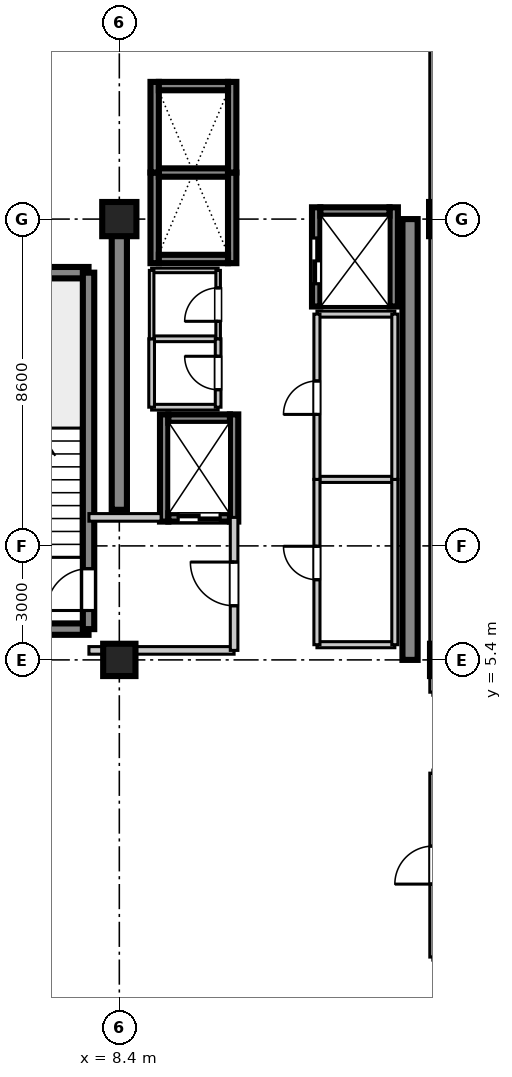
"""IFC4 building model, lengths in metres.
Left out: names, types, materials, properties, quantities, classifications, styles, units other than length and angle.
Written with IfcOpenShell. Run it as: python <this file> out.ifc"""

import sys

from ifc_helpers import new_model, si_unit, direction, frame, frame_2d, origin, origin_2d, place, context, subcontext, project, spatial, rectangle, extrude, source, transform, mapped, element, fill, save


model = new_model("IFC4")
c1 = context("Model", 3, precision=1e-05, world=origin(), true_north=direction((0.0, 1.0)))
c2 = subcontext(c1, "Body", "Model", "MODEL_VIEW")
j1 = project(units=[si_unit("LENGTHUNIT", "METRE"), si_unit("PLANEANGLEUNIT", "RADIAN")], contexts=[c1])
p1 = place(None, origin())
s1 = spatial("IfcSite", under=j1, at=p1, CompositionType="ELEMENT")
p2 = place(p1, origin())
s2 = spatial("IfcBuilding", under=s1, at=p2, CompositionType="ELEMENT")
p3 = place(p2, frame((0.0, 0.0, 266.3)))
s3 = spatial("IfcBuildingStorey", under=s2, at=p3, CompositionType="ELEMENT", Elevation=266.3)
m1 = source(origin(), c2, "Body", "SweptSolid", [
    extrude(rectangle(XDim=0.85, YDim=0.85, at=origin_2d()), origin(), (0.0, 0.0, 1.0), 3.705),
])
p4 = place(p3, frame((8.4, 5.4, 0.0), z_axis=(0.0, 0.0, 1.0), x_axis=(1.0, 0.0, 0.0)))
e1 = element("IfcColumn", 1, at=p4, inside=s3, PredefinedType="PILASTER", context=c2, shape_type="MappedRepresentation", body=[
    mapped(m1, transform((0.0, 0.0, 0.0), scale=1.0)),
])
m2 = source(origin(), c2, "Body", "SweptSolid", [
    extrude(rectangle(XDim=0.9, YDim=0.9, at=origin_2d()), origin(), (0.0, 0.0, 1.0), 3.705),
])
p5 = place(p3, frame((8.4, 17.0, 0.0), z_axis=(0.0, 0.0, 1.0), x_axis=(1.0, 0.0, 0.0)))
e2 = element("IfcColumn", 2, at=p5, inside=s3, PredefinedType="COLUMN", context=c2, shape_type="MappedRepresentation", body=[
    mapped(m2, transform((0.0, 0.0, 0.0), scale=1.0)),
])
p6 = place(p3, frame((17.0, 5.4, 0.0), z_axis=(0.0, 0.0, 1.0), x_axis=(1.0, 0.0, 0.0)))
e3 = element("IfcColumn", 3, at=p6, inside=s3, PredefinedType="PILASTER", context=c2, shape_type="MappedRepresentation", body=[
    mapped(m1, transform((0.0, 0.0, 0.0), scale=1.0)),
])
p7 = place(p3, frame((17.0, 17.0, 0.0), z_axis=(0.0, 0.0, 1.0), x_axis=(1.0, 0.0, 0.0)))
e4 = element("IfcColumn", 4, at=p7, inside=s3, PredefinedType="COLUMN", context=c2, shape_type="MappedRepresentation", body=[
    mapped(m2, transform((0.0, 0.0, 0.0), scale=1.0)),
])
m3 = source(origin(), c2, "Body", "SweptSolid", [
    extrude(rectangle(XDim=7.65, YDim=0.4, at=frame_2d((3.825, 0.0))), origin(), (0.0, 0.0, 1.0), 3.45),
])
p8 = place(p3, frame((8.4, 9.35, 0.0), z_axis=(0.0, 0.0, 1.0), x_axis=(0.0, 1.0, 0.0)))
e5 = element("IfcWall", 5, at=p8, inside=s3, PredefinedType="SHEAR", context=c2, shape_type="MappedRepresentation", body=[
    mapped(m3, transform((0.0, 0.0, 0.0), scale=1.0)),
])
m4 = source(origin(), c2, "Body", "SweptSolid", [
    extrude(rectangle(XDim=11.6, YDim=0.4, at=frame_2d((5.8, 0.0))), origin(), (0.0, 0.0, 1.0), 3.45),
])
p9 = place(p3, frame((16.05, 5.4, 0.0), z_axis=(0.0, 0.0, 1.0), x_axis=(0.0, 1.0, 0.0)))
e6 = element("IfcWall", 6, at=p9, inside=s3, PredefinedType="SHEAR", context=c2, shape_type="MappedRepresentation", body=[
    mapped(m4, transform((0.0, 0.0, 0.0), scale=1.0)),
])
m5 = source(origin(), c2, "Body", "SweptSolid", [
    extrude(rectangle(XDim=3.98, YDim=0.3, at=frame_2d((1.99, 0.0))), origin(), (0.0, 0.0, 1.0), 3.45),
])
for number, where, z_axis, x_axis in (
    (7, (3.61, 6.21, 0.0), (0.0, 0.0, 1.0), (1.0, 0.0, 0.0)),
    (8, (3.61, 15.59, 0.0), (0.0, 0.0, 1.0), (1.0, 0.0, 0.0)),
):
    element("IfcWall", number, at=place(p3, frame(where, z_axis=z_axis, x_axis=x_axis)), inside=s3, PredefinedType="SHEAR", context=c2, shape_type="MappedRepresentation", body=[
        mapped(m5, transform((0.0, 0.0, 0.0), scale=1.0)),
    ])
m6 = source(origin(), c2, "Body", "SweptSolid", [
    extrude(rectangle(XDim=9.38, YDim=0.3, at=frame_2d((4.69, 0.0))), origin(), (0.0, 0.0, 1.0), 3.45),
])
p10 = place(p3, frame((7.59, 6.21, 0.0), z_axis=(0.0, 0.0, 1.0), x_axis=(0.0, 1.0, 0.0)))
e9 = element("IfcWall", 9, at=p10, inside=s3, PredefinedType="SHEAR", context=c2, shape_type="MappedRepresentation", body=[
    mapped(m6, transform((0.0, 0.0, 0.0), scale=1.0)),
])
p11 = place(p10, frame((0.49, 0.0, 0.0)))
e10 = element("IfcOpeningElement", 10, at=p11, cuts=e9, PredefinedType="OPENING", context=c2, shape_type="SweptSolid", body=[
    extrude(rectangle(XDim=1.1, YDim=2.15, at=frame_2d((0.55, 1.075))), frame((0.0, 0.16, 0.0), z_axis=(0.0, -1.0, 0.0), x_axis=(1.0, 0.0, 0.0)), (0.0, 0.0, 1.0), 0.32),
])
m7 = source(origin(), c2, "Body", "SweptSolid", [
    extrude(rectangle(XDim=2.385, YDim=0.22, at=frame_2d((1.192, 0.0))), origin(), (0.0, 0.0, 1.0), 3.45),
])
for number, where, z_axis, x_axis in (
    (11, (9.33, 15.84, 0.0), (0.0, 0.0, 1.0), (0.0, 1.0, 0.0)),
    (12, (11.37, 15.84, 0.0), (0.0, 0.0, 1.0), (0.0, 1.0, 0.0)),
):
    element("IfcWall", number, at=place(p3, frame(where, z_axis=z_axis, x_axis=x_axis)), inside=s3, PredefinedType="SHEAR", context=c2, shape_type="MappedRepresentation", body=[
        mapped(m7, transform((0.0, 0.0, 0.0), scale=1.0)),
    ])
m8 = source(origin(), c2, "Body", "SweptSolid", [
    extrude(rectangle(XDim=1.82, YDim=0.22, at=frame_2d((0.91, 0.0))), origin(), (0.0, 0.0, 1.0), 3.45),
])
p12 = place(p3, frame((9.44, 15.95, 0.0), z_axis=(0.0, 0.0, 1.0), x_axis=(1.0, 0.0, 0.0)))
e13 = element("IfcWall", 13, at=p12, inside=s3, PredefinedType="SHEAR", context=c2, shape_type="MappedRepresentation", body=[
    mapped(m8, transform((0.0, 0.0, 0.0), scale=1.0)),
])
m9 = source(origin(), c2, "Body", "SweptSolid", [
    extrude(rectangle(XDim=1.82, YDim=0.22, at=frame_2d((0.91, 0.0))), origin(), (0.0, 0.0, 1.0), 3.75),
])
p13 = place(p3, frame((9.44, 18.225, 0.0), z_axis=(0.0, 0.0, 1.0), x_axis=(1.0, 0.0, 0.0)))
e14 = element("IfcWall", 14, at=p13, inside=s3, PredefinedType="SHEAR", context=c2, shape_type="MappedRepresentation", body=[
    mapped(m9, transform((0.0, 0.0, 0.0), scale=1.0)),
])
for number, where, z_axis, x_axis in (
    (15, (9.33, 18.225, 0.0), (0.0, 0.0, 1.0), (0.0, 1.0, 0.0)),
    (16, (11.37, 18.225, 0.0), (0.0, 0.0, 1.0), (0.0, 1.0, 0.0)),
):
    element("IfcWall", number, at=place(p3, frame(where, z_axis=z_axis, x_axis=x_axis)), inside=s3, PredefinedType="SHEAR", context=c2, shape_type="MappedRepresentation", body=[
        mapped(m7, transform((0.0, 0.0, 0.0), scale=1.0)),
    ])
p14 = place(p3, frame((9.44, 20.5, 0.0), z_axis=(0.0, 0.0, 1.0), x_axis=(1.0, 0.0, 0.0)))
e17 = element("IfcWall", 17, at=p14, inside=s3, PredefinedType="SHEAR", context=c2, shape_type="MappedRepresentation", body=[
    mapped(m8, transform((0.0, 0.0, 0.0), scale=1.0)),
])
m10 = source(origin(), c2, "Body", "SweptSolid", [
    extrude(rectangle(XDim=2.82, YDim=0.22, at=frame_2d((1.41, 0.0))), origin(), (0.0, 0.0, 1.0), 3.45),
])
for number, where, z_axis, x_axis in (
    (18, (9.58, 9.04, 0.0), (0.0, 0.0, 1.0), (0.0, 1.0, 0.0)),
    (19, (11.42, 9.04, 0.0), (0.0, 0.0, 1.0), (0.0, 1.0, 0.0)),
):
    element("IfcWall", number, at=place(p3, frame(where, z_axis=z_axis, x_axis=x_axis)), inside=s3, PredefinedType="SHEAR", context=c2, shape_type="MappedRepresentation", body=[
        mapped(m10, transform((0.0, 0.0, 0.0), scale=1.0)),
    ])
m11 = source(origin(), c2, "Body", "SweptSolid", [
    extrude(rectangle(XDim=1.62, YDim=0.22, at=frame_2d((0.81, 0.0))), origin(), (0.0, 0.0, 1.0), 3.45),
])
p15 = place(p3, frame((9.69, 9.15, 0.0), z_axis=(0.0, 0.0, 1.0), x_axis=(1.0, 0.0, 0.0)))
e20 = element("IfcWall", 20, at=p15, inside=s3, PredefinedType="SHEAR", context=c2, shape_type="MappedRepresentation", body=[
    mapped(m11, transform((0.0, 0.0, 0.0), scale=1.0)),
])
p16 = place(p15, frame((0.26, 0.0, 0.0)))
e21 = element("IfcOpeningElement", 21, at=p16, cuts=e20, PredefinedType="OPENING", context=c2, shape_type="SweptSolid", body=[
    extrude(rectangle(XDim=1.1, YDim=2.2, at=frame_2d((0.55, 1.1))), frame((0.0, 0.12, 0.0), z_axis=(0.0, -1.0, 0.0), x_axis=(1.0, 0.0, 0.0)), (0.0, 0.0, 1.0), 0.24),
])
p17 = place(p3, frame((9.69, 11.75, 0.0), z_axis=(0.0, 0.0, 1.0), x_axis=(1.0, 0.0, 0.0)))
e22 = element("IfcWall", 22, at=p17, inside=s3, PredefinedType="SHEAR", context=c2, shape_type="MappedRepresentation", body=[
    mapped(m11, transform((0.0, 0.0, 0.0), scale=1.0)),
])
m12 = source(origin(), c2, "Body", "SweptSolid", [
    extrude(rectangle(XDim=2.61, YDim=0.22, at=frame_2d((1.305, 0.0))), origin(), (0.0, 0.0, 1.0), 3.45),
])
p18 = place(p3, frame((13.58, 14.7, 0.0), z_axis=(0.0, 0.0, 1.0), x_axis=(0.0, 1.0, 0.0)))
e23 = element("IfcWall", 23, at=p18, inside=s3, PredefinedType="SHEAR", context=c2, shape_type="MappedRepresentation", body=[
    mapped(m12, transform((0.0, 0.0, 0.0), scale=1.0)),
])
p19 = place(p18, frame((0.6, 0.0, 0.0)))
e24 = element("IfcOpeningElement", 24, at=p19, cuts=e23, PredefinedType="OPENING", context=c2, shape_type="SweptSolid", body=[
    extrude(rectangle(XDim=1.2, YDim=2.2, at=frame_2d((0.6, 1.1))), frame((0.0, 0.12, 0.0), z_axis=(0.0, -1.0, 0.0), x_axis=(1.0, 0.0, 0.0)), (0.0, 0.0, 1.0), 0.24),
])
p20 = place(p3, frame((15.62, 14.7, 0.0), z_axis=(0.0, 0.0, 1.0), x_axis=(0.0, 1.0, 0.0)))
e25 = element("IfcWall", 25, at=p20, inside=s3, PredefinedType="SHEAR", context=c2, shape_type="MappedRepresentation", body=[
    mapped(m12, transform((0.0, 0.0, 0.0), scale=1.0)),
])
p21 = place(p3, frame((13.69, 17.2, 0.0), z_axis=(0.0, 0.0, 1.0), x_axis=(1.0, 0.0, 0.0)))
e26 = element("IfcWall", 26, at=p21, inside=s3, PredefinedType="SHEAR", context=c2, shape_type="MappedRepresentation", body=[
    mapped(m8, transform((0.0, 0.0, 0.0), scale=1.0)),
])
m13 = source(origin(), c2, "Body", "SweptSolid", [
    extrude(rectangle(XDim=3.82, YDim=0.2, at=frame_2d((1.91, 0.0))), origin(), (0.0, 0.0, 1.0), 2.79),
])
p22 = place(p3, frame((7.6, 5.65, 0.0), z_axis=(0.0, 0.0, 1.0), x_axis=(1.0, 0.0, 0.0)))
e27 = element("IfcWall", 27, at=p22, inside=s3, PredefinedType="PARTITIONING", context=c2, shape_type="MappedRepresentation", body=[
    mapped(m13, transform((0.0, 0.0, 0.0), scale=1.0)),
])
m14 = source(origin(), c2, "Body", "SweptSolid", [
    extrude(rectangle(XDim=1.9, YDim=0.2, at=frame_2d((0.95, 0.0))), origin(), (0.0, 0.0, 1.0), 2.79),
])
p23 = place(p3, frame((7.6, 9.15, 0.0), z_axis=(0.0, 0.0, 1.0), x_axis=(1.0, 0.0, 0.0)))
e28 = element("IfcWall", 28, at=p23, inside=s3, PredefinedType="PARTITIONING", context=c2, shape_type="MappedRepresentation", body=[
    mapped(m14, transform((0.0, 0.0, 0.0), scale=1.0)),
])
m15 = source(origin(), c2, "Body", "SweptSolid", [
    extrude(rectangle(XDim=3.5, YDim=0.2, at=frame_2d((1.75, 0.0))), origin(), (0.0, 0.0, 1.0), 2.79),
])
p24 = place(p3, frame((11.42, 5.65, 0.0), z_axis=(0.0, 0.0, 1.0), x_axis=(0.0, 1.0, 0.0)))
e29 = element("IfcWall", 29, at=p24, inside=s3, PredefinedType="PARTITIONING", context=c2, shape_type="MappedRepresentation", body=[
    mapped(m15, transform((0.0, 0.0, 0.0), scale=1.0)),
])
p25 = place(p24, frame((1.175, 0.0, 0.0)))
e30 = element("IfcOpeningElement", 30, at=p25, cuts=e29, PredefinedType="OPENING", context=c2, shape_type="SweptSolid", body=[
    extrude(rectangle(XDim=1.15, YDim=2.15, at=frame_2d((0.575, 1.075))), frame((0.0, 0.11, 0.0), z_axis=(0.0, -1.0, 0.0), x_axis=(1.0, 0.0, 0.0)), (0.0, 0.0, 1.0), 0.22),
])
m16 = source(origin(), c2, "Body", "SweptSolid", [
    extrude(rectangle(XDim=1.75, YDim=0.15, at=frame_2d((0.875, 0.0))), origin(), (0.0, 0.0, 1.0), 2.79),
])
for number, where, z_axis, x_axis in (
    (31, (9.25, 12.05, 0.0), (0.0, 0.0, 1.0), (1.0, 0.0, 0.0)),
    (32, (9.25, 13.85, 0.0), (0.0, 0.0, 1.0), (1.0, 0.0, 0.0)),
):
    element("IfcWall", number, at=place(p3, frame(where, z_axis=z_axis, x_axis=x_axis)), inside=s3, PredefinedType="PARTITIONING", context=c2, shape_type="MappedRepresentation", body=[
        mapped(m16, transform((0.0, 0.0, 0.0), scale=1.0)),
    ])
m17 = source(origin(), c2, "Body", "SweptSolid", [
    extrude(rectangle(XDim=1.8, YDim=0.15, at=frame_2d((0.9, 0.0))), origin(), (0.0, 0.0, 1.0), 2.79),
])
p26 = place(p3, frame((9.25, 12.05, 0.0), z_axis=(0.0, 0.0, 1.0), x_axis=(0.0, 1.0, 0.0)))
e33 = element("IfcWall", 33, at=p26, inside=s3, PredefinedType="PARTITIONING", context=c2, shape_type="MappedRepresentation", body=[
    mapped(m17, transform((0.0, 0.0, 0.0), scale=1.0)),
])
p27 = place(p3, frame((11.0, 12.05, 0.0), z_axis=(0.0, 0.0, 1.0), x_axis=(0.0, 1.0, 0.0)))
e34 = element("IfcWall", 34, at=p27, inside=s3, PredefinedType="PARTITIONING", context=c2, shape_type="MappedRepresentation", body=[
    mapped(m17, transform((0.0, 0.0, 0.0), scale=1.0)),
])
p28 = place(p27, frame((0.46, 0.0, 0.0)))
e35 = element("IfcOpeningElement", 35, at=p28, cuts=e34, PredefinedType="OPENING", context=c2, shape_type="SweptSolid", body=[
    extrude(rectangle(XDim=0.88, YDim=2.1, at=frame_2d((0.44, 1.05))), frame((0.0, 0.085, 0.0), z_axis=(0.0, -1.0, 0.0), x_axis=(1.0, 0.0, 0.0)), (0.0, 0.0, 1.0), 0.17),
])
m18 = source(origin(), c2, "Body", "SweptSolid", [
    extrude(rectangle(XDim=1.75, YDim=0.12, at=frame_2d((0.875, 0.0))), origin(), (0.0, 0.0, 1.0), 2.79),
])
p29 = place(p3, frame((9.25, 15.65, 0.0), z_axis=(0.0, 0.0, 1.0), x_axis=(1.0, 0.0, 0.0)))
e36 = element("IfcWall", 36, at=p29, inside=s3, PredefinedType="PARTITIONING", context=c2, shape_type="MappedRepresentation", body=[
    mapped(m18, transform((0.0, 0.0, 0.0), scale=1.0)),
])
m19 = source(origin(), c2, "Body", "SweptSolid", [
    extrude(rectangle(XDim=1.8, YDim=0.12, at=frame_2d((0.9, 0.0))), origin(), (0.0, 0.0, 1.0), 2.79),
])
p30 = place(p3, frame((9.25, 13.85, 0.0), z_axis=(0.0, 0.0, 1.0), x_axis=(0.0, 1.0, 0.0)))
e37 = element("IfcWall", 37, at=p30, inside=s3, PredefinedType="PARTITIONING", context=c2, shape_type="MappedRepresentation", body=[
    mapped(m19, transform((0.0, 0.0, 0.0), scale=1.0)),
])
p31 = place(p3, frame((11.0, 13.85, 0.0), z_axis=(0.0, 0.0, 1.0), x_axis=(0.0, 1.0, 0.0)))
e38 = element("IfcWall", 38, at=p31, inside=s3, PredefinedType="PARTITIONING", context=c2, shape_type="MappedRepresentation", body=[
    mapped(m19, transform((0.0, 0.0, 0.0), scale=1.0)),
])
p32 = place(p31, frame((0.46, 0.0, 0.0)))
e39 = element("IfcOpeningElement", 39, at=p32, cuts=e38, PredefinedType="OPENING", context=c2, shape_type="SweptSolid", body=[
    extrude(rectangle(XDim=0.88, YDim=2.1, at=frame_2d((0.44, 1.05))), frame((0.0, 0.07, 0.0), z_axis=(0.0, -1.0, 0.0), x_axis=(1.0, 0.0, 0.0)), (0.0, 0.0, 1.0), 0.14),
])
m20 = source(origin(), c2, "Body", "SweptSolid", [
    extrude(rectangle(XDim=2.05, YDim=0.16, at=frame_2d((1.025, 0.0))), origin(), (0.0, 0.0, 1.0), 2.79),
])
for number, where, z_axis, x_axis in (
    (40, (13.6, 5.8, 0.0), (0.0, 0.0, 1.0), (1.0, 0.0, 0.0)),
    (41, (13.6, 10.15, 0.0), (0.0, 0.0, 1.0), (1.0, 0.0, 0.0)),
):
    element("IfcWall", number, at=place(p3, frame(where, z_axis=z_axis, x_axis=x_axis)), inside=s3, PredefinedType="PARTITIONING", context=c2, shape_type="MappedRepresentation", body=[
        mapped(m20, transform((0.0, 0.0, 0.0), scale=1.0)),
    ])
m21 = source(origin(), c2, "Body", "SweptSolid", [
    extrude(rectangle(XDim=4.35, YDim=0.16, at=frame_2d((2.175, 0.0))), origin(), (0.0, 0.0, 1.0), 2.79),
])
p33 = place(p3, frame((13.6, 5.8, 0.0), z_axis=(0.0, 0.0, 1.0), x_axis=(0.0, 1.0, 0.0)))
e42 = element("IfcWall", 42, at=p33, inside=s3, PredefinedType="PARTITIONING", context=c2, shape_type="MappedRepresentation", body=[
    mapped(m21, transform((0.0, 0.0, 0.0), scale=1.0)),
])
p34 = place(p33, frame((1.71, 0.0, 0.0)))
e43 = element("IfcOpeningElement", 43, at=p34, cuts=e42, PredefinedType="OPENING", context=c2, shape_type="SweptSolid", body=[
    extrude(rectangle(XDim=0.88, YDim=2.1, at=frame_2d((0.44, 1.05))), frame((0.0, 0.09, 0.0), z_axis=(0.0, -1.0, 0.0), x_axis=(1.0, 0.0, 0.0)), (0.0, 0.0, 1.0), 0.18),
])
p35 = place(p3, frame((15.65, 5.8, 0.0), z_axis=(0.0, 0.0, 1.0), x_axis=(0.0, 1.0, 0.0)))
e44 = element("IfcWall", 44, at=p35, inside=s3, PredefinedType="PARTITIONING", context=c2, shape_type="MappedRepresentation", body=[
    mapped(m21, transform((0.0, 0.0, 0.0), scale=1.0)),
])
p36 = place(p3, frame((13.6, 14.5, 0.0), z_axis=(0.0, 0.0, 1.0), x_axis=(1.0, 0.0, 0.0)))
e45 = element("IfcWall", 45, at=p36, inside=s3, PredefinedType="PARTITIONING", context=c2, shape_type="MappedRepresentation", body=[
    mapped(m20, transform((0.0, 0.0, 0.0), scale=1.0)),
])
m22 = source(origin(), c2, "Body", "SweptSolid", [
    extrude(rectangle(XDim=4.35, YDim=0.16, at=frame_2d((2.175, 0.0))), origin(), (0.0, 0.0, 1.0), 2.79),
])
p37 = place(p3, frame((13.6, 10.15, 0.0), z_axis=(0.0, 0.0, 1.0), x_axis=(0.0, 1.0, 0.0)))
e46 = element("IfcWall", 46, at=p37, inside=s3, PredefinedType="PARTITIONING", context=c2, shape_type="MappedRepresentation", body=[
    mapped(m22, transform((0.0, 0.0, 0.0), scale=1.0)),
])
p38 = place(p37, frame((1.71, 0.0, 0.0)))
e47 = element("IfcOpeningElement", 47, at=p38, cuts=e46, PredefinedType="OPENING", context=c2, shape_type="SweptSolid", body=[
    extrude(rectangle(XDim=0.88, YDim=2.1, at=frame_2d((0.44, 1.05))), frame((0.0, 0.09, 0.0), z_axis=(0.0, -1.0, 0.0), x_axis=(1.0, 0.0, 0.0)), (0.0, 0.0, 1.0), 0.18),
])
p39 = place(p3, frame((15.65, 10.15, 0.0), z_axis=(0.0, 0.0, 1.0), x_axis=(0.0, 1.0, 0.0)))
e48 = element("IfcWall", 48, at=p39, inside=s3, PredefinedType="PARTITIONING", context=c2, shape_type="MappedRepresentation", body=[
    mapped(m22, transform((0.0, 0.0, 0.0), scale=1.0)),
])
m23 = source(origin(), c2, "Body", "SweptSolid", [
    extrude(rectangle(XDim=17.95, YDim=0.16, at=frame_2d((8.975, 0.0))), origin(), (0.0, 0.0, 1.0), 2.79),
])
p40 = place(p3, frame((16.65, 4.55, 0.0), z_axis=(0.0, 0.0, 1.0), x_axis=(0.0, 1.0, 0.0)))
e49 = element("IfcWall", 49, at=p40, inside=s3, PredefinedType="PARTITIONING", context=c2, shape_type="MappedRepresentation", body=[
    mapped(m23, transform((0.0, 0.0, 0.0), scale=1.0)),
])
m24 = source(origin(), c2, "Body", "SweptSolid", [
    extrude(rectangle(XDim=4.84, YDim=0.16, at=frame_2d((2.42, 0.0))), origin(), (0.0, 0.0, 1.0), 2.79),
])
p41 = place(p3, frame((16.65, -2.42, 0.0), z_axis=(0.0, 0.0, 1.0), x_axis=(0.0, 1.0, 0.0)))
e50 = element("IfcWall", 50, at=p41, inside=s3, PredefinedType="PARTITIONING", context=c2, shape_type="MappedRepresentation", body=[
    mapped(m24, transform((0.0, 0.0, 0.0), scale=1.0)),
])
p42 = place(p41, frame((1.92, 0.0, 0.0)))
e51 = element("IfcOpeningElement", 51, at=p42, cuts=e50, PredefinedType="OPENING", context=c2, shape_type="SweptSolid", body=[
    extrude(rectangle(XDim=1.0, YDim=2.1, at=frame_2d((0.5, 1.05))), frame((0.0, 0.09, 0.0), z_axis=(0.0, -1.0, 0.0), x_axis=(1.0, 0.0, 0.0)), (0.0, 0.0, 1.0), 0.18),
])
m25 = source(origin(), c2, "Body", "SweptSolid", [
    extrude(rectangle(XDim=1.1, YDim=2.15, at=frame_2d((0.55, 1.075))), frame((0.0, 0.025, 0.0), z_axis=(0.0, -1.0, 0.0), x_axis=(1.0, 0.0, 0.0)), (0.0, 0.0, 1.0), 0.05),
])
p43 = place(p11, origin())
e52 = element("IfcDoor", 52, at=p43, inside=s3, OperationType="SINGLE_SWING_LEFT", PredefinedType="DOOR", context=c2, shape_type="MappedRepresentation", body=[
    mapped(m25, transform((0.0, 0.0, 0.0), scale=1.0)),
])
fill(e10, e52)
m26 = source(origin(), c2, "Body", "SweptSolid", [
    extrude(rectangle(XDim=1.1, YDim=2.2, at=frame_2d((0.55, 1.1))), frame((0.0, 0.025, 0.0), z_axis=(0.0, -1.0, 0.0), x_axis=(1.0, 0.0, 0.0)), (0.0, 0.0, 1.0), 0.05),
])
p44 = place(p16, frame((1.1, 0.0, 0.0), z_axis=(0.0, 0.0, 1.0), x_axis=(-1.0, 0.0, 0.0)))
e53 = element("IfcDoor", 53, at=p44, inside=s3, OperationType="DOUBLE_DOOR_SLIDING", PredefinedType="DOOR", context=c2, shape_type="MappedRepresentation", body=[
    mapped(m26, transform((0.0, 0.0, 0.0), scale=1.0)),
])
fill(e21, e53)
m27 = source(origin(), c2, "Body", "SweptSolid", [
    extrude(rectangle(XDim=1.2, YDim=2.2, at=frame_2d((0.6, 1.1))), frame((0.0, 0.025, 0.0), z_axis=(0.0, -1.0, 0.0), x_axis=(1.0, 0.0, 0.0)), (0.0, 0.0, 1.0), 0.05),
])
p45 = place(p19, origin())
e54 = element("IfcDoor", 54, at=p45, inside=s3, OperationType="DOUBLE_DOOR_SLIDING", PredefinedType="DOOR", context=c2, shape_type="MappedRepresentation", body=[
    mapped(m27, transform((0.0, 0.0, 0.0), scale=1.0)),
])
fill(e24, e54)
m28 = source(origin(), c2, "Body", "SweptSolid", [
    extrude(rectangle(XDim=1.15, YDim=2.15, at=frame_2d((0.575, 1.075))), frame((0.0, 0.025, 0.0), z_axis=(0.0, -1.0, 0.0), x_axis=(1.0, 0.0, 0.0)), (0.0, 0.0, 1.0), 0.05),
])
p46 = place(p25, frame((1.15, 0.0, 0.0), z_axis=(0.0, 0.0, 1.0), x_axis=(-1.0, 0.0, 0.0)))
e55 = element("IfcDoor", 55, at=p46, inside=s3, OperationType="SINGLE_SWING_RIGHT", PredefinedType="DOOR", context=c2, shape_type="MappedRepresentation", body=[
    mapped(m28, transform((0.0, 0.0, 0.0), scale=1.0)),
])
fill(e30, e55)
m29 = source(origin(), c2, "Body", "SweptSolid", [
    extrude(rectangle(XDim=0.88, YDim=2.1, at=frame_2d((0.44, 1.05))), frame((0.0, 0.025, 0.0), z_axis=(0.0, -1.0, 0.0), x_axis=(1.0, 0.0, 0.0)), (0.0, 0.0, 1.0), 0.05),
])
p47 = place(p28, origin())
e56 = element("IfcDoor", 56, at=p47, inside=s3, OperationType="SINGLE_SWING_RIGHT", PredefinedType="DOOR", context=c2, shape_type="MappedRepresentation", body=[
    mapped(m29, transform((0.0, 0.0, 0.0), scale=1.0)),
])
fill(e35, e56)
p48 = place(p32, origin())
e57 = element("IfcDoor", 57, at=p48, inside=s3, OperationType="SINGLE_SWING_LEFT", PredefinedType="DOOR", context=c2, shape_type="MappedRepresentation", body=[
    mapped(m29, transform((0.0, 0.0, 0.0), scale=1.0)),
])
fill(e39, e57)
p49 = place(p34, frame((0.88, 0.0, 0.0), z_axis=(0.0, 0.0, 1.0), x_axis=(-1.0, 0.0, 0.0)))
e58 = element("IfcDoor", 58, at=p49, inside=s3, OperationType="SINGLE_SWING_RIGHT", PredefinedType="DOOR", context=c2, shape_type="MappedRepresentation", body=[
    mapped(m29, transform((0.0, 0.0, 0.0), scale=1.0)),
])
fill(e43, e58)
p50 = place(p38, frame((0.88, 0.0, 0.0), z_axis=(0.0, 0.0, 1.0), x_axis=(-1.0, 0.0, 0.0)))
e59 = element("IfcDoor", 59, at=p50, inside=s3, OperationType="SINGLE_SWING_LEFT", PredefinedType="DOOR", context=c2, shape_type="MappedRepresentation", body=[
    mapped(m29, transform((0.0, 0.0, 0.0), scale=1.0)),
])
fill(e47, e59)
m30 = source(origin(), c2, "Body", "SweptSolid", [
    extrude(rectangle(XDim=1.0, YDim=2.1, at=frame_2d((0.5, 1.05))), frame((0.0, 0.025, 0.0), z_axis=(0.0, -1.0, 0.0), x_axis=(1.0, 0.0, 0.0)), (0.0, 0.0, 1.0), 0.05),
])
p51 = place(p42, frame((1.0, 0.0, 0.0), z_axis=(0.0, 0.0, 1.0), x_axis=(-1.0, 0.0, 0.0)))
e60 = element("IfcDoor", 60, at=p51, inside=s3, OperationType="SINGLE_SWING_LEFT", PredefinedType="DOOR", context=c2, shape_type="MappedRepresentation", body=[
    mapped(m30, transform((0.0, 0.0, 0.0), scale=1.0)),
])
fill(e51, e60)
save(model, sys.argv[1])
